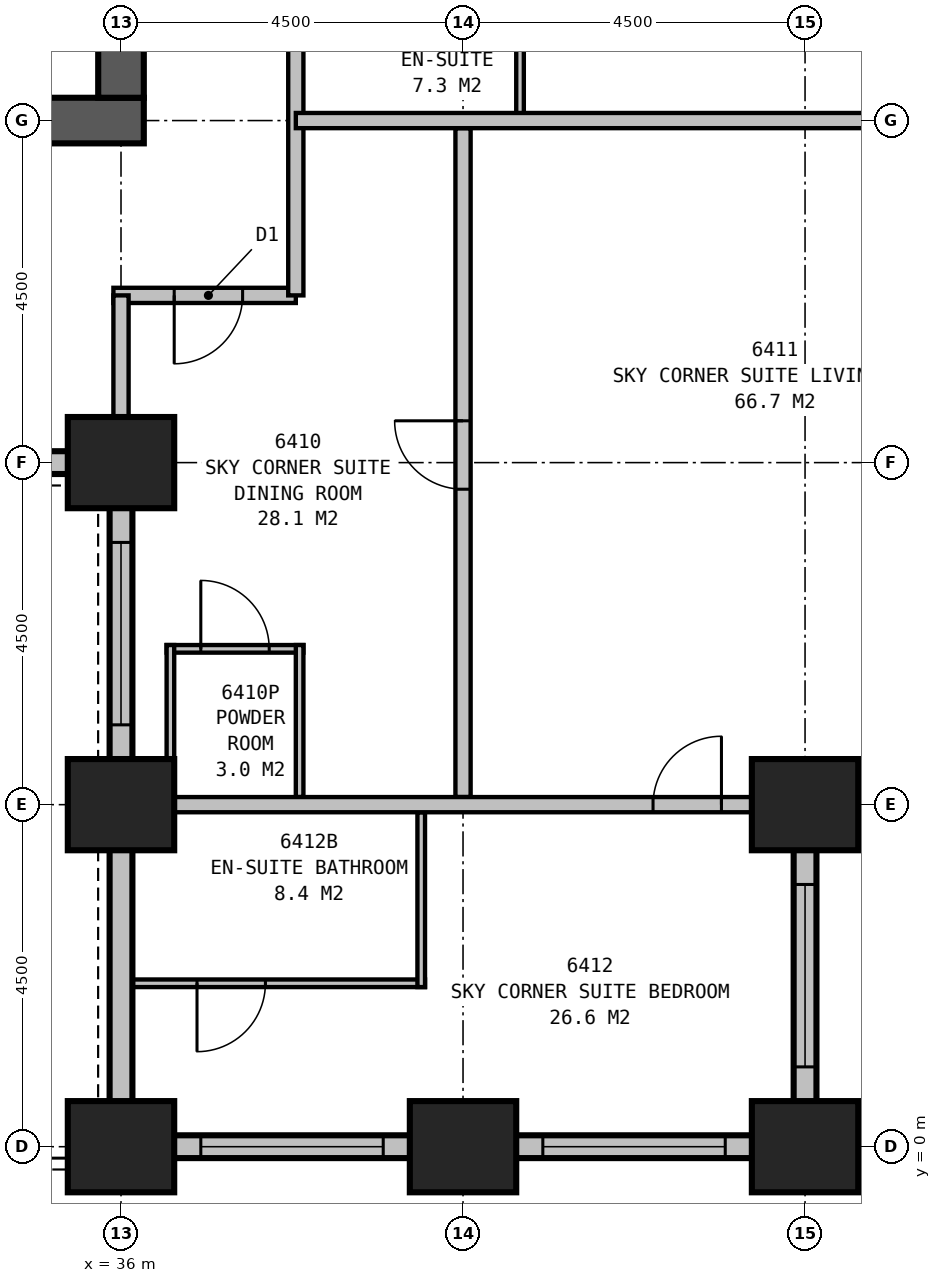
"""IFC4 building model, lengths in metres.
Left out: names, types, materials, properties, quantities, classifications, styles, units other than length and angle.
Written with IfcOpenShell. Run it as: python <this file> out.ifc"""

import sys

from ifc_helpers import new_model, si_unit, direction, frame, frame_2d, origin, origin_2d, place, context, subcontext, project, spatial, rectangle, extrude, element, fill, save


model = new_model("IFC4")
c1 = context("Model", 3, precision=1e-05, world=origin(), true_north=direction((0.0, 1.0)))
c2 = subcontext(c1, "Body", "Model", "MODEL_VIEW")
j1 = project(units=[si_unit("LENGTHUNIT", "METRE"), si_unit("PLANEANGLEUNIT", "RADIAN")], contexts=[c1])
p1 = place(None, origin())
s1 = spatial("IfcSite", under=j1, at=p1, CompositionType="ELEMENT")
p2 = place(p1, origin())
s2 = spatial("IfcBuilding", under=s1, at=p2, CompositionType="ELEMENT")
p3 = place(p2, frame((0.0, 0.0, 250.7)))
s3 = spatial("IfcBuildingStorey", under=s2, at=p3, CompositionType="ELEMENT", Elevation=250.7)
for number, where, z_axis, x_axis in (
    (1, (36.0, 9.0, 0.0), (0.0, 0.0, 1.0), (1.0, 0.0, 0.0)),
    (2, (36.0, 4.5, 0.0), (0.0, 0.0, 1.0), (1.0, 0.0, 0.0)),
    (3, (36.0, 0.0, 0.0), (0.0, 0.0, 1.0), (1.0, 0.0, 0.0)),
    (4, (40.5, 0.0, 0.0), (0.0, 0.0, 1.0), (1.0, 0.0, 0.0)),
    (5, (45.0, 0.0, 0.0), (0.0, 0.0, 1.0), (1.0, 0.0, 0.0)),
    (6, (45.0, 4.5, 0.0), (0.0, 0.0, 1.0), (1.0, 0.0, 0.0)),
):
    element("IfcColumn", number, at=place(p3, frame(where, z_axis=z_axis, x_axis=x_axis)), inside=s3, PredefinedType="COLUMN", context=c2, shape_type="SweptSolid", body=[
        extrude(rectangle(XDim=1.4, YDim=1.2, at=origin_2d()), origin(), (0.0, 0.0, 1.0), 3.9),
    ])
p4 = place(p3, frame((13.2, 13.5, 0.0), z_axis=(0.0, 0.0, 1.0), x_axis=(1.0, 0.0, 0.0)))
e7 = element("IfcWall", 7, at=p4, inside=s3, PredefinedType="SHEAR", context=c2, shape_type="SweptSolid", body=[
    extrude(rectangle(XDim=23.1, YDim=0.6, at=frame_2d((11.55, 0.0))), origin(), (0.0, 0.0, 1.0), 3.9),
])
p5 = place(p3, frame((36.0, 13.8, 0.0), z_axis=(0.0, 0.0, 1.0), x_axis=(0.0, 1.0, 0.0)))
e8 = element("IfcWall", 8, at=p5, inside=s3, PredefinedType="SHEAR", context=c2, shape_type="SweptSolid", body=[
    extrude(rectangle(XDim=2.7, YDim=0.6, at=frame_2d((1.35, 0.0))), origin(), (0.0, 0.0, 1.0), 3.9),
])
p6 = place(p3, frame((9.85, 9.0, 0.0), z_axis=(0.0, 0.0, 1.0), x_axis=(1.0, 0.0, 0.0)))
e9 = element("IfcWall", 9, at=p6, inside=s3, PredefinedType="STANDARD", context=c2, shape_type="SweptSolid", body=[
    extrude(rectangle(XDim=26.3, YDim=0.3, at=frame_2d((13.15, 0.0))), origin(), (0.0, 0.0, 1.0), 2.65),
])
p7 = place(p6, frame((1.15, 0.0, 0.5)))
e10 = element("IfcOpeningElement", 10, at=p7, cuts=e9, PredefinedType="OPENING", context=c2, shape_type="SweptSolid", body=[
    extrude(rectangle(XDim=1.5, YDim=2.0, at=frame_2d((0.75, 1.0))), frame((0.0, 0.16, 0.0), z_axis=(0.0, -1.0, 0.0), x_axis=(1.0, 0.0, 0.0)), (0.0, 0.0, 1.0), 0.32),
])
p8 = place(p6, frame((4.7, 0.0, 0.5)))
e11 = element("IfcOpeningElement", 11, at=p8, cuts=e9, PredefinedType="OPENING", context=c2, shape_type="SweptSolid", body=[
    extrude(rectangle(XDim=2.4, YDim=2.0, at=frame_2d((1.2, 1.0))), frame((0.0, 0.16, 0.0), z_axis=(0.0, -1.0, 0.0), x_axis=(1.0, 0.0, 0.0)), (0.0, 0.0, 1.0), 0.32),
])
p9 = place(p6, frame((9.2, 0.0, 0.5)))
e12 = element("IfcOpeningElement", 12, at=p9, cuts=e9, PredefinedType="OPENING", context=c2, shape_type="SweptSolid", body=[
    extrude(rectangle(XDim=2.4, YDim=2.0, at=frame_2d((1.2, 1.0))), frame((0.0, 0.16, 0.0), z_axis=(0.0, -1.0, 0.0), x_axis=(1.0, 0.0, 0.0)), (0.0, 0.0, 1.0), 0.32),
])
p10 = place(p6, frame((13.7, 0.0, 0.5)))
e13 = element("IfcOpeningElement", 13, at=p10, cuts=e9, PredefinedType="OPENING", context=c2, shape_type="SweptSolid", body=[
    extrude(rectangle(XDim=2.4, YDim=2.0, at=frame_2d((1.2, 1.0))), frame((0.0, 0.16, 0.0), z_axis=(0.0, -1.0, 0.0), x_axis=(1.0, 0.0, 0.0)), (0.0, 0.0, 1.0), 0.32),
])
p11 = place(p6, frame((18.8, 0.0, 0.0)))
e14 = element("IfcOpeningElement", 14, at=p11, cuts=e9, PredefinedType="OPENING", context=c2, shape_type="SweptSolid", body=[
    extrude(rectangle(XDim=1.2, YDim=2.4, at=frame_2d((0.6, 1.2))), frame((0.0, 0.16, 0.0), z_axis=(0.0, -1.0, 0.0), x_axis=(1.0, 0.0, 0.0)), (0.0, 0.0, 1.0), 0.32),
])
p12 = place(p6, frame((23.3, 0.0, 0.0)))
e15 = element("IfcOpeningElement", 15, at=p12, cuts=e9, PredefinedType="OPENING", context=c2, shape_type="SweptSolid", body=[
    extrude(rectangle(XDim=1.2, YDim=2.4, at=frame_2d((0.6, 1.2))), frame((0.0, 0.16, 0.0), z_axis=(0.0, -1.0, 0.0), x_axis=(1.0, 0.0, 0.0)), (0.0, 0.0, 1.0), 0.32),
])
p13 = place(p3, frame((36.0, 9.15, 0.0), z_axis=(0.0, 0.0, 1.0), x_axis=(0.0, -1.0, 0.0)))
e16 = element("IfcWall", 16, at=p13, inside=s3, PredefinedType="STANDARD", context=c2, shape_type="SweptSolid", body=[
    extrude(rectangle(XDim=9.3, YDim=0.3, at=frame_2d((4.65, 0.0))), origin(), (0.0, 0.0, 1.0), 2.65),
])
p14 = place(p13, frame((1.2, 0.0, 0.5)))
e17 = element("IfcOpeningElement", 17, at=p14, cuts=e16, PredefinedType="OPENING", context=c2, shape_type="SweptSolid", body=[
    extrude(rectangle(XDim=2.4, YDim=2.0, at=frame_2d((1.2, 1.0))), frame((0.0, 0.16, 0.0), z_axis=(0.0, -1.0, 0.0), x_axis=(1.0, 0.0, 0.0)), (0.0, 0.0, 1.0), 0.32),
])
p15 = place(p3, frame((35.85, 0.0, 0.0), z_axis=(0.0, 0.0, 1.0), x_axis=(1.0, 0.0, 0.0)))
e18 = element("IfcWall", 18, at=p15, inside=s3, PredefinedType="STANDARD", context=c2, shape_type="SweptSolid", body=[
    extrude(rectangle(XDim=9.3, YDim=0.3, at=frame_2d((4.65, 0.0))), origin(), (0.0, 0.0, 1.0), 2.65),
])
p16 = place(p15, frame((1.2, 0.0, 0.5)))
e19 = element("IfcOpeningElement", 19, at=p16, cuts=e18, PredefinedType="OPENING", context=c2, shape_type="SweptSolid", body=[
    extrude(rectangle(XDim=2.4, YDim=2.0, at=frame_2d((1.2, 1.0))), frame((0.0, 0.16, 0.0), z_axis=(0.0, -1.0, 0.0), x_axis=(1.0, 0.0, 0.0)), (0.0, 0.0, 1.0), 0.32),
])
p17 = place(p15, frame((5.7, 0.0, 0.5)))
e20 = element("IfcOpeningElement", 20, at=p17, cuts=e18, PredefinedType="OPENING", context=c2, shape_type="SweptSolid", body=[
    extrude(rectangle(XDim=2.4, YDim=2.0, at=frame_2d((1.2, 1.0))), frame((0.0, 0.16, 0.0), z_axis=(0.0, -1.0, 0.0), x_axis=(1.0, 0.0, 0.0)), (0.0, 0.0, 1.0), 0.32),
])
p18 = place(p3, frame((45.0, -0.15, 0.0), z_axis=(0.0, 0.0, 1.0), x_axis=(0.0, 1.0, 0.0)))
e21 = element("IfcWall", 21, at=p18, inside=s3, PredefinedType="STANDARD", context=c2, shape_type="SweptSolid", body=[
    extrude(rectangle(XDim=4.8, YDim=0.3, at=frame_2d((2.4, 0.0))), origin(), (0.0, 0.0, 1.0), 2.65),
])
p19 = place(p18, frame((1.2, 0.0, 0.5)))
e22 = element("IfcOpeningElement", 22, at=p19, cuts=e21, PredefinedType="OPENING", context=c2, shape_type="SweptSolid", body=[
    extrude(rectangle(XDim=2.4, YDim=2.0, at=frame_2d((1.2, 1.0))), frame((0.0, 0.16, 0.0), z_axis=(0.0, -1.0, 0.0), x_axis=(1.0, 0.0, 0.0)), (0.0, 0.0, 1.0), 0.32),
])
p20 = place(p3, frame((44.85, 4.5, 0.0), z_axis=(0.0, 0.0, 1.0), x_axis=(1.0, 0.0, 0.0)))
e23 = element("IfcWall", 23, at=p20, inside=s3, PredefinedType="STANDARD", context=c2, shape_type="SweptSolid", body=[
    extrude(rectangle(XDim=4.3, YDim=0.3, at=frame_2d((2.15, 0.0))), origin(), (0.0, 0.0, 1.0), 2.65),
])
p21 = place(p20, frame((1.4, 0.0, 0.5)))
e24 = element("IfcOpeningElement", 24, at=p21, cuts=e23, PredefinedType="OPENING", context=c2, shape_type="SweptSolid", body=[
    extrude(rectangle(XDim=1.5, YDim=2.0, at=frame_2d((0.75, 1.0))), frame((0.0, 0.16, 0.0), z_axis=(0.0, -1.0, 0.0), x_axis=(1.0, 0.0, 0.0)), (0.0, 0.0, 1.0), 0.32),
])
p22 = place(p3, frame((49.017, 4.351, 0.0), z_axis=(0.0, 0.0, 1.0), x_axis=(-0.110433201132, 0.993883548555, 0.0)))
e25 = element("IfcWall", 25, at=p22, inside=s3, PredefinedType="STANDARD", context=c2, shape_type="SweptSolid", body=[
    extrude(rectangle(XDim=31.994, YDim=0.3, at=frame_2d((15.997, 0.0))), origin(), (0.0, 0.0, 1.0), 2.65),
])
p23 = place(p22, frame((1.214, 0.0, 0.5)))
e26 = element("IfcOpeningElement", 26, at=p23, cuts=e25, PredefinedType="OPENING", context=c2, shape_type="SweptSolid", body=[
    extrude(rectangle(XDim=2.4, YDim=2.0, at=frame_2d((1.2, 1.0))), frame((0.0, 0.16, 0.0), z_axis=(0.0, -1.0, 0.0), x_axis=(1.0, 0.0, 0.0)), (0.0, 0.0, 1.0), 0.32),
])
p24 = place(p22, frame((5.742, 0.0, 0.5)))
e27 = element("IfcOpeningElement", 27, at=p24, cuts=e25, PredefinedType="OPENING", context=c2, shape_type="SweptSolid", body=[
    extrude(rectangle(XDim=2.4, YDim=2.0, at=frame_2d((1.2, 1.0))), frame((0.0, 0.16, 0.0), z_axis=(0.0, -1.0, 0.0), x_axis=(1.0, 0.0, 0.0)), (0.0, 0.0, 1.0), 0.32),
])
p25 = place(p22, frame((10.269, 0.0, 0.5)))
e28 = element("IfcOpeningElement", 28, at=p25, cuts=e25, PredefinedType="OPENING", context=c2, shape_type="SweptSolid", body=[
    extrude(rectangle(XDim=2.4, YDim=2.0, at=frame_2d((1.2, 1.0))), frame((0.0, 0.16, 0.0), z_axis=(0.0, -1.0, 0.0), x_axis=(1.0, 0.0, 0.0)), (0.0, 0.0, 1.0), 0.32),
])
p26 = place(p22, frame((14.797, 0.0, 0.5)))
e29 = element("IfcOpeningElement", 29, at=p26, cuts=e25, PredefinedType="OPENING", context=c2, shape_type="SweptSolid", body=[
    extrude(rectangle(XDim=2.4, YDim=2.0, at=frame_2d((1.2, 1.0))), frame((0.0, 0.16, 0.0), z_axis=(0.0, -1.0, 0.0), x_axis=(1.0, 0.0, 0.0)), (0.0, 0.0, 1.0), 0.32),
])
p27 = place(p22, frame((19.325, 0.0, 0.5)))
e30 = element("IfcOpeningElement", 30, at=p27, cuts=e25, PredefinedType="OPENING", context=c2, shape_type="SweptSolid", body=[
    extrude(rectangle(XDim=2.4, YDim=2.0, at=frame_2d((1.2, 1.0))), frame((0.0, 0.16, 0.0), z_axis=(0.0, -1.0, 0.0), x_axis=(1.0, 0.0, 0.0)), (0.0, 0.0, 1.0), 0.32),
])
p28 = place(p22, frame((23.852, 0.0, 0.5)))
e31 = element("IfcOpeningElement", 31, at=p28, cuts=e25, PredefinedType="OPENING", context=c2, shape_type="SweptSolid", body=[
    extrude(rectangle(XDim=2.4, YDim=2.0, at=frame_2d((1.2, 1.0))), frame((0.0, 0.16, 0.0), z_axis=(0.0, -1.0, 0.0), x_axis=(1.0, 0.0, 0.0)), (0.0, 0.0, 1.0), 0.32),
])
p29 = place(p22, frame((28.38, 0.0, 0.5)))
e32 = element("IfcOpeningElement", 32, at=p29, cuts=e25, PredefinedType="OPENING", context=c2, shape_type="SweptSolid", body=[
    extrude(rectangle(XDim=2.4, YDim=2.0, at=frame_2d((1.2, 1.0))), frame((0.0, 0.16, 0.0), z_axis=(0.0, -1.0, 0.0), x_axis=(1.0, 0.0, 0.0)), (0.0, 0.0, 1.0), 0.32),
])
p30 = place(p3, frame((35.9, 11.2, 0.0), z_axis=(0.0, 0.0, 1.0), x_axis=(1.0, 0.0, 0.0)))
e33 = element("IfcWall", 33, at=p30, inside=s3, PredefinedType="PARTITIONING", context=c2, shape_type="SweptSolid", body=[
    extrude(rectangle(XDim=2.4, YDim=0.2, at=frame_2d((1.2, 0.0))), origin(), (0.0, 0.0, 1.0), 3.65),
])
p31 = place(p30, frame((1.7, 0.0, 0.0), z_axis=(0.0, 0.0, 1.0), x_axis=(-1.0, 0.0, 0.0)))
e34 = element("IfcOpeningElement", 34, at=p31, cuts=e33, PredefinedType="OPENING", context=c2, shape_type="SweptSolid", body=[
    extrude(rectangle(XDim=0.9, YDim=2.1, at=frame_2d((0.45, 1.05))), frame((0.0, 0.11, 0.0), z_axis=(0.0, -1.0, 0.0), x_axis=(1.0, 0.0, 0.0)), (0.0, 0.0, 1.0), 0.22),
])
p32 = place(p3, frame((38.3, 11.2, 0.0), z_axis=(0.0, 0.0, 1.0), x_axis=(0.0, 1.0, 0.0)))
e35 = element("IfcWall", 35, at=p32, inside=s3, PredefinedType="PARTITIONING", context=c2, shape_type="SweptSolid", body=[
    extrude(rectangle(XDim=18.7, YDim=0.2, at=frame_2d((9.35, 0.0))), origin(), (0.0, 0.0, 1.0), 3.65),
])
p33 = place(p32, frame((6.45, 0.0, 0.0), z_axis=(0.0, 0.0, 1.0), x_axis=(-1.0, 0.0, 0.0)))
e36 = element("IfcOpeningElement", 36, at=p33, cuts=e35, PredefinedType="OPENING", context=c2, shape_type="SweptSolid", body=[
    extrude(rectangle(XDim=1.0, YDim=2.1, at=frame_2d((0.5, 1.05))), frame((0.0, 0.11, 0.0), z_axis=(0.0, -1.0, 0.0), x_axis=(1.0, 0.0, 0.0)), (0.0, 0.0, 1.0), 0.22),
])
p34 = place(p32, frame((10.45, 0.0, 0.0), z_axis=(0.0, 0.0, 1.0), x_axis=(-1.0, 0.0, 0.0)))
e37 = element("IfcOpeningElement", 37, at=p34, cuts=e35, PredefinedType="OPENING", context=c2, shape_type="SweptSolid", body=[
    extrude(rectangle(XDim=0.9, YDim=2.1, at=frame_2d((0.45, 1.05))), frame((0.0, 0.11, 0.0), z_axis=(0.0, -1.0, 0.0), x_axis=(1.0, 0.0, 0.0)), (0.0, 0.0, 1.0), 0.22),
])
p35 = place(p3, frame((41.25, 13.5, 0.0), z_axis=(0.0, 0.0, 1.0), x_axis=(0.0, 1.0, 0.0)))
e38 = element("IfcWall", 38, at=p35, inside=s3, PredefinedType="PLUMBINGWALL", context=c2, shape_type="SweptSolid", body=[
    extrude(rectangle(XDim=2.8, YDim=0.1, at=frame_2d((1.4, 0.0))), origin(), (0.0, 0.0, 1.0), 3.65),
])
p36 = place(p3, frame((38.3, 13.5, 0.0), z_axis=(0.0, 0.0, 1.0), x_axis=(1.0, 0.0, 0.0)))
e39 = element("IfcWall", 39, at=p36, inside=s3, PredefinedType="PARTITIONING", context=c2, shape_type="SweptSolid", body=[
    extrude(rectangle(XDim=9.921, YDim=0.2, at=frame_2d((4.96, 0.0))), origin(), (0.0, 0.0, 1.0), 2.35),
])
p37 = place(p3, frame((36.0, 11.2, 0.0), z_axis=(0.0, 0.0, 1.0), x_axis=(0.0, -1.0, 0.0)))
e40 = element("IfcWall", 40, at=p37, inside=s3, PredefinedType="PARTITIONING", context=c2, shape_type="SweptSolid", body=[
    extrude(rectangle(XDim=2.05, YDim=0.2, at=frame_2d((1.025, 0.0))), origin(), (0.0, 0.0, 1.0), 2.65),
])
p38 = place(p3, frame((35.9, 4.5, 0.0), z_axis=(0.0, 0.0, 1.0), x_axis=(1.0, 0.0, 0.0)))
e41 = element("IfcWall", 41, at=p38, inside=s3, PredefinedType="PARTITIONING", context=c2, shape_type="SweptSolid", body=[
    extrude(rectangle(XDim=9.1, YDim=0.2, at=frame_2d((4.55, 0.0))), origin(), (0.0, 0.0, 1.0), 3.65),
])
p39 = place(p38, frame((7.1, 0.0, 0.0)))
e42 = element("IfcOpeningElement", 42, at=p39, cuts=e41, PredefinedType="OPENING", context=c2, shape_type="SweptSolid", body=[
    extrude(rectangle(XDim=0.9, YDim=2.1, at=frame_2d((0.45, 1.05))), frame((0.0, 0.11, 0.0), z_axis=(0.0, -1.0, 0.0), x_axis=(1.0, 0.0, 0.0)), (0.0, 0.0, 1.0), 0.22),
])
p40 = place(p3, frame((40.5, 4.6, 0.0), z_axis=(0.0, 0.0, 1.0), x_axis=(0.0, 1.0, 0.0)))
e43 = element("IfcWall", 43, at=p40, inside=s3, PredefinedType="PARTITIONING", context=c2, shape_type="SweptSolid", body=[
    extrude(rectangle(XDim=8.8, YDim=0.2, at=frame_2d((4.4, 0.0))), origin(), (0.0, 0.0, 1.0), 2.75),
])
p41 = place(p40, frame((4.05, 0.0, 0.0)))
e44 = element("IfcOpeningElement", 44, at=p41, cuts=e43, PredefinedType="OPENING", context=c2, shape_type="SweptSolid", body=[
    extrude(rectangle(XDim=0.9, YDim=2.1, at=frame_2d((0.45, 1.05))), frame((0.0, 0.11, 0.0), z_axis=(0.0, -1.0, 0.0), x_axis=(1.0, 0.0, 0.0)), (0.0, 0.0, 1.0), 0.22),
])
p42 = place(p3, frame((38.35, 4.6, 0.0), z_axis=(0.0, 0.0, 1.0), x_axis=(0.0, 1.0, 0.0)))
e45 = element("IfcWall", 45, at=p42, inside=s3, PredefinedType="PLUMBINGWALL", context=c2, shape_type="SweptSolid", body=[
    extrude(rectangle(XDim=2.0, YDim=0.1, at=frame_2d((1.0, 0.0))), origin(), (0.0, 0.0, 1.0), 3.65),
])
p43 = place(p3, frame((36.65, 4.6, 0.0), z_axis=(0.0, 0.0, 1.0), x_axis=(0.0, 1.0, 0.0)))
e46 = element("IfcWall", 46, at=p43, inside=s3, PredefinedType="PLUMBINGWALL", context=c2, shape_type="SweptSolid", body=[
    extrude(rectangle(XDim=2.0, YDim=0.1, at=frame_2d((1.0, 0.0))), origin(), (0.0, 0.0, 1.0), 2.65),
])
p44 = place(p3, frame((36.6, 6.55, 0.0), z_axis=(0.0, 0.0, 1.0), x_axis=(1.0, 0.0, 0.0)))
e47 = element("IfcWall", 47, at=p44, inside=s3, PredefinedType="PLUMBINGWALL", context=c2, shape_type="SweptSolid", body=[
    extrude(rectangle(XDim=1.8, YDim=0.1, at=frame_2d((0.9, 0.0))), origin(), (0.0, 0.0, 1.0), 3.65),
])
p45 = place(p44, frame((0.45, 0.0, 0.0)))
e48 = element("IfcOpeningElement", 48, at=p45, cuts=e47, PredefinedType="OPENING", context=c2, shape_type="SweptSolid", body=[
    extrude(rectangle(XDim=0.9, YDim=2.1, at=frame_2d((0.45, 1.05))), frame((0.0, 0.06, 0.0), z_axis=(0.0, -1.0, 0.0), x_axis=(1.0, 0.0, 0.0)), (0.0, 0.0, 1.0), 0.12),
])
p46 = place(p3, frame((39.95, 4.4, 0.0), z_axis=(0.0, 0.0, 1.0), x_axis=(0.0, -1.0, 0.0)))
e49 = element("IfcWall", 49, at=p46, inside=s3, PredefinedType="PLUMBINGWALL", context=c2, shape_type="SweptSolid", body=[
    extrude(rectangle(XDim=2.3, YDim=0.1, at=frame_2d((1.15, 0.0))), origin(), (0.0, 0.0, 1.0), 3.65),
])
p47 = place(p3, frame((36.1, 2.15, 0.0), z_axis=(0.0, 0.0, 1.0), x_axis=(1.0, 0.0, 0.0)))
e50 = element("IfcWall", 50, at=p47, inside=s3, PredefinedType="PLUMBINGWALL", context=c2, shape_type="SweptSolid", body=[
    extrude(rectangle(XDim=3.9, YDim=0.1, at=frame_2d((1.95, 0.0))), origin(), (0.0, 0.0, 1.0), 3.65),
])
p48 = place(p47, frame((1.8, 0.0, 0.0), z_axis=(0.0, 0.0, 1.0), x_axis=(-1.0, 0.0, 0.0)))
e51 = element("IfcOpeningElement", 51, at=p48, cuts=e50, PredefinedType="OPENING", context=c2, shape_type="SweptSolid", body=[
    extrude(rectangle(XDim=0.9, YDim=2.1, at=frame_2d((0.45, 1.05))), frame((0.0, 0.06, 0.0), z_axis=(0.0, -1.0, 0.0), x_axis=(1.0, 0.0, 0.0)), (0.0, 0.0, 1.0), 0.12),
])
p49 = place(p14, origin())
e52 = element("IfcWindow", 52, at=p49, inside=s3, PartitioningType="SINGLE_PANEL", PredefinedType="WINDOW", context=c2, shape_type="SweptSolid", body=[
    extrude(rectangle(XDim=2.4, YDim=2.0, at=frame_2d((1.2, 1.0))), frame((0.0, 0.03, 0.0), z_axis=(0.0, -1.0, 0.0), x_axis=(1.0, 0.0, 0.0)), (0.0, 0.0, 1.0), 0.06),
])
fill(e17, e52)
p50 = place(p16, origin())
e53 = element("IfcWindow", 53, at=p50, inside=s3, PartitioningType="SINGLE_PANEL", PredefinedType="WINDOW", context=c2, shape_type="SweptSolid", body=[
    extrude(rectangle(XDim=2.4, YDim=2.0, at=frame_2d((1.2, 1.0))), frame((0.0, 0.03, 0.0), z_axis=(0.0, -1.0, 0.0), x_axis=(1.0, 0.0, 0.0)), (0.0, 0.0, 1.0), 0.06),
])
fill(e19, e53)
p51 = place(p17, origin())
e54 = element("IfcWindow", 54, at=p51, inside=s3, PartitioningType="SINGLE_PANEL", PredefinedType="WINDOW", context=c2, shape_type="SweptSolid", body=[
    extrude(rectangle(XDim=2.4, YDim=2.0, at=frame_2d((1.2, 1.0))), frame((0.0, 0.03, 0.0), z_axis=(0.0, -1.0, 0.0), x_axis=(1.0, 0.0, 0.0)), (0.0, 0.0, 1.0), 0.06),
])
fill(e20, e54)
p52 = place(p19, origin())
e55 = element("IfcWindow", 55, at=p52, inside=s3, PartitioningType="SINGLE_PANEL", PredefinedType="WINDOW", context=c2, shape_type="SweptSolid", body=[
    extrude(rectangle(XDim=2.4, YDim=2.0, at=frame_2d((1.2, 1.0))), frame((0.0, 0.03, 0.0), z_axis=(0.0, -1.0, 0.0), x_axis=(1.0, 0.0, 0.0)), (0.0, 0.0, 1.0), 0.06),
])
fill(e22, e55)
p53 = place(p31, origin())
e56 = element("IfcDoor", 56, at=p53, inside=s3, OperationType="SINGLE_SWING_RIGHT", PredefinedType="DOOR", context=c2, shape_type="SweptSolid", body=[
    extrude(rectangle(XDim=0.9, YDim=2.1, at=frame_2d((0.45, 1.05))), frame((0.0, 0.025, 0.0), z_axis=(0.0, -1.0, 0.0), x_axis=(1.0, 0.0, 0.0)), (0.0, 0.0, 1.0), 0.05),
])
fill(e34, e56)
p54 = place(p39, origin())
e57 = element("IfcDoor", 57, at=p54, inside=s3, OperationType="SINGLE_SWING_RIGHT", PredefinedType="DOOR", context=c2, shape_type="SweptSolid", body=[
    extrude(rectangle(XDim=0.9, YDim=2.1, at=frame_2d((0.45, 1.05))), frame((0.0, 0.025, 0.0), z_axis=(0.0, -1.0, 0.0), x_axis=(1.0, 0.0, 0.0)), (0.0, 0.0, 1.0), 0.05),
])
fill(e42, e57)
p55 = place(p41, origin())
e58 = element("IfcDoor", 58, at=p55, inside=s3, OperationType="SINGLE_SWING_RIGHT", PredefinedType="DOOR", context=c2, shape_type="SweptSolid", body=[
    extrude(rectangle(XDim=0.9, YDim=2.1, at=frame_2d((0.45, 1.05))), frame((0.0, 0.025, 0.0), z_axis=(0.0, -1.0, 0.0), x_axis=(1.0, 0.0, 0.0)), (0.0, 0.0, 1.0), 0.05),
])
fill(e44, e58)
p56 = place(p45, origin())
e59 = element("IfcDoor", 59, at=p56, inside=s3, OperationType="SINGLE_SWING_LEFT", PredefinedType="DOOR", context=c2, shape_type="SweptSolid", body=[
    extrude(rectangle(XDim=0.9, YDim=2.1, at=frame_2d((0.45, 1.05))), frame((0.0, 0.025, 0.0), z_axis=(0.0, -1.0, 0.0), x_axis=(1.0, 0.0, 0.0)), (0.0, 0.0, 1.0), 0.05),
])
fill(e48, e59)
p57 = place(p48, origin())
e60 = element("IfcDoor", 60, at=p57, inside=s3, OperationType="SINGLE_SWING_RIGHT", PredefinedType="DOOR", context=c2, shape_type="SweptSolid", body=[
    extrude(rectangle(XDim=0.9, YDim=2.1, at=frame_2d((0.45, 1.05))), frame((0.0, 0.025, 0.0), z_axis=(0.0, -1.0, 0.0), x_axis=(1.0, 0.0, 0.0)), (0.0, 0.0, 1.0), 0.05),
])
fill(e51, e60)
save(model, sys.argv[1])
